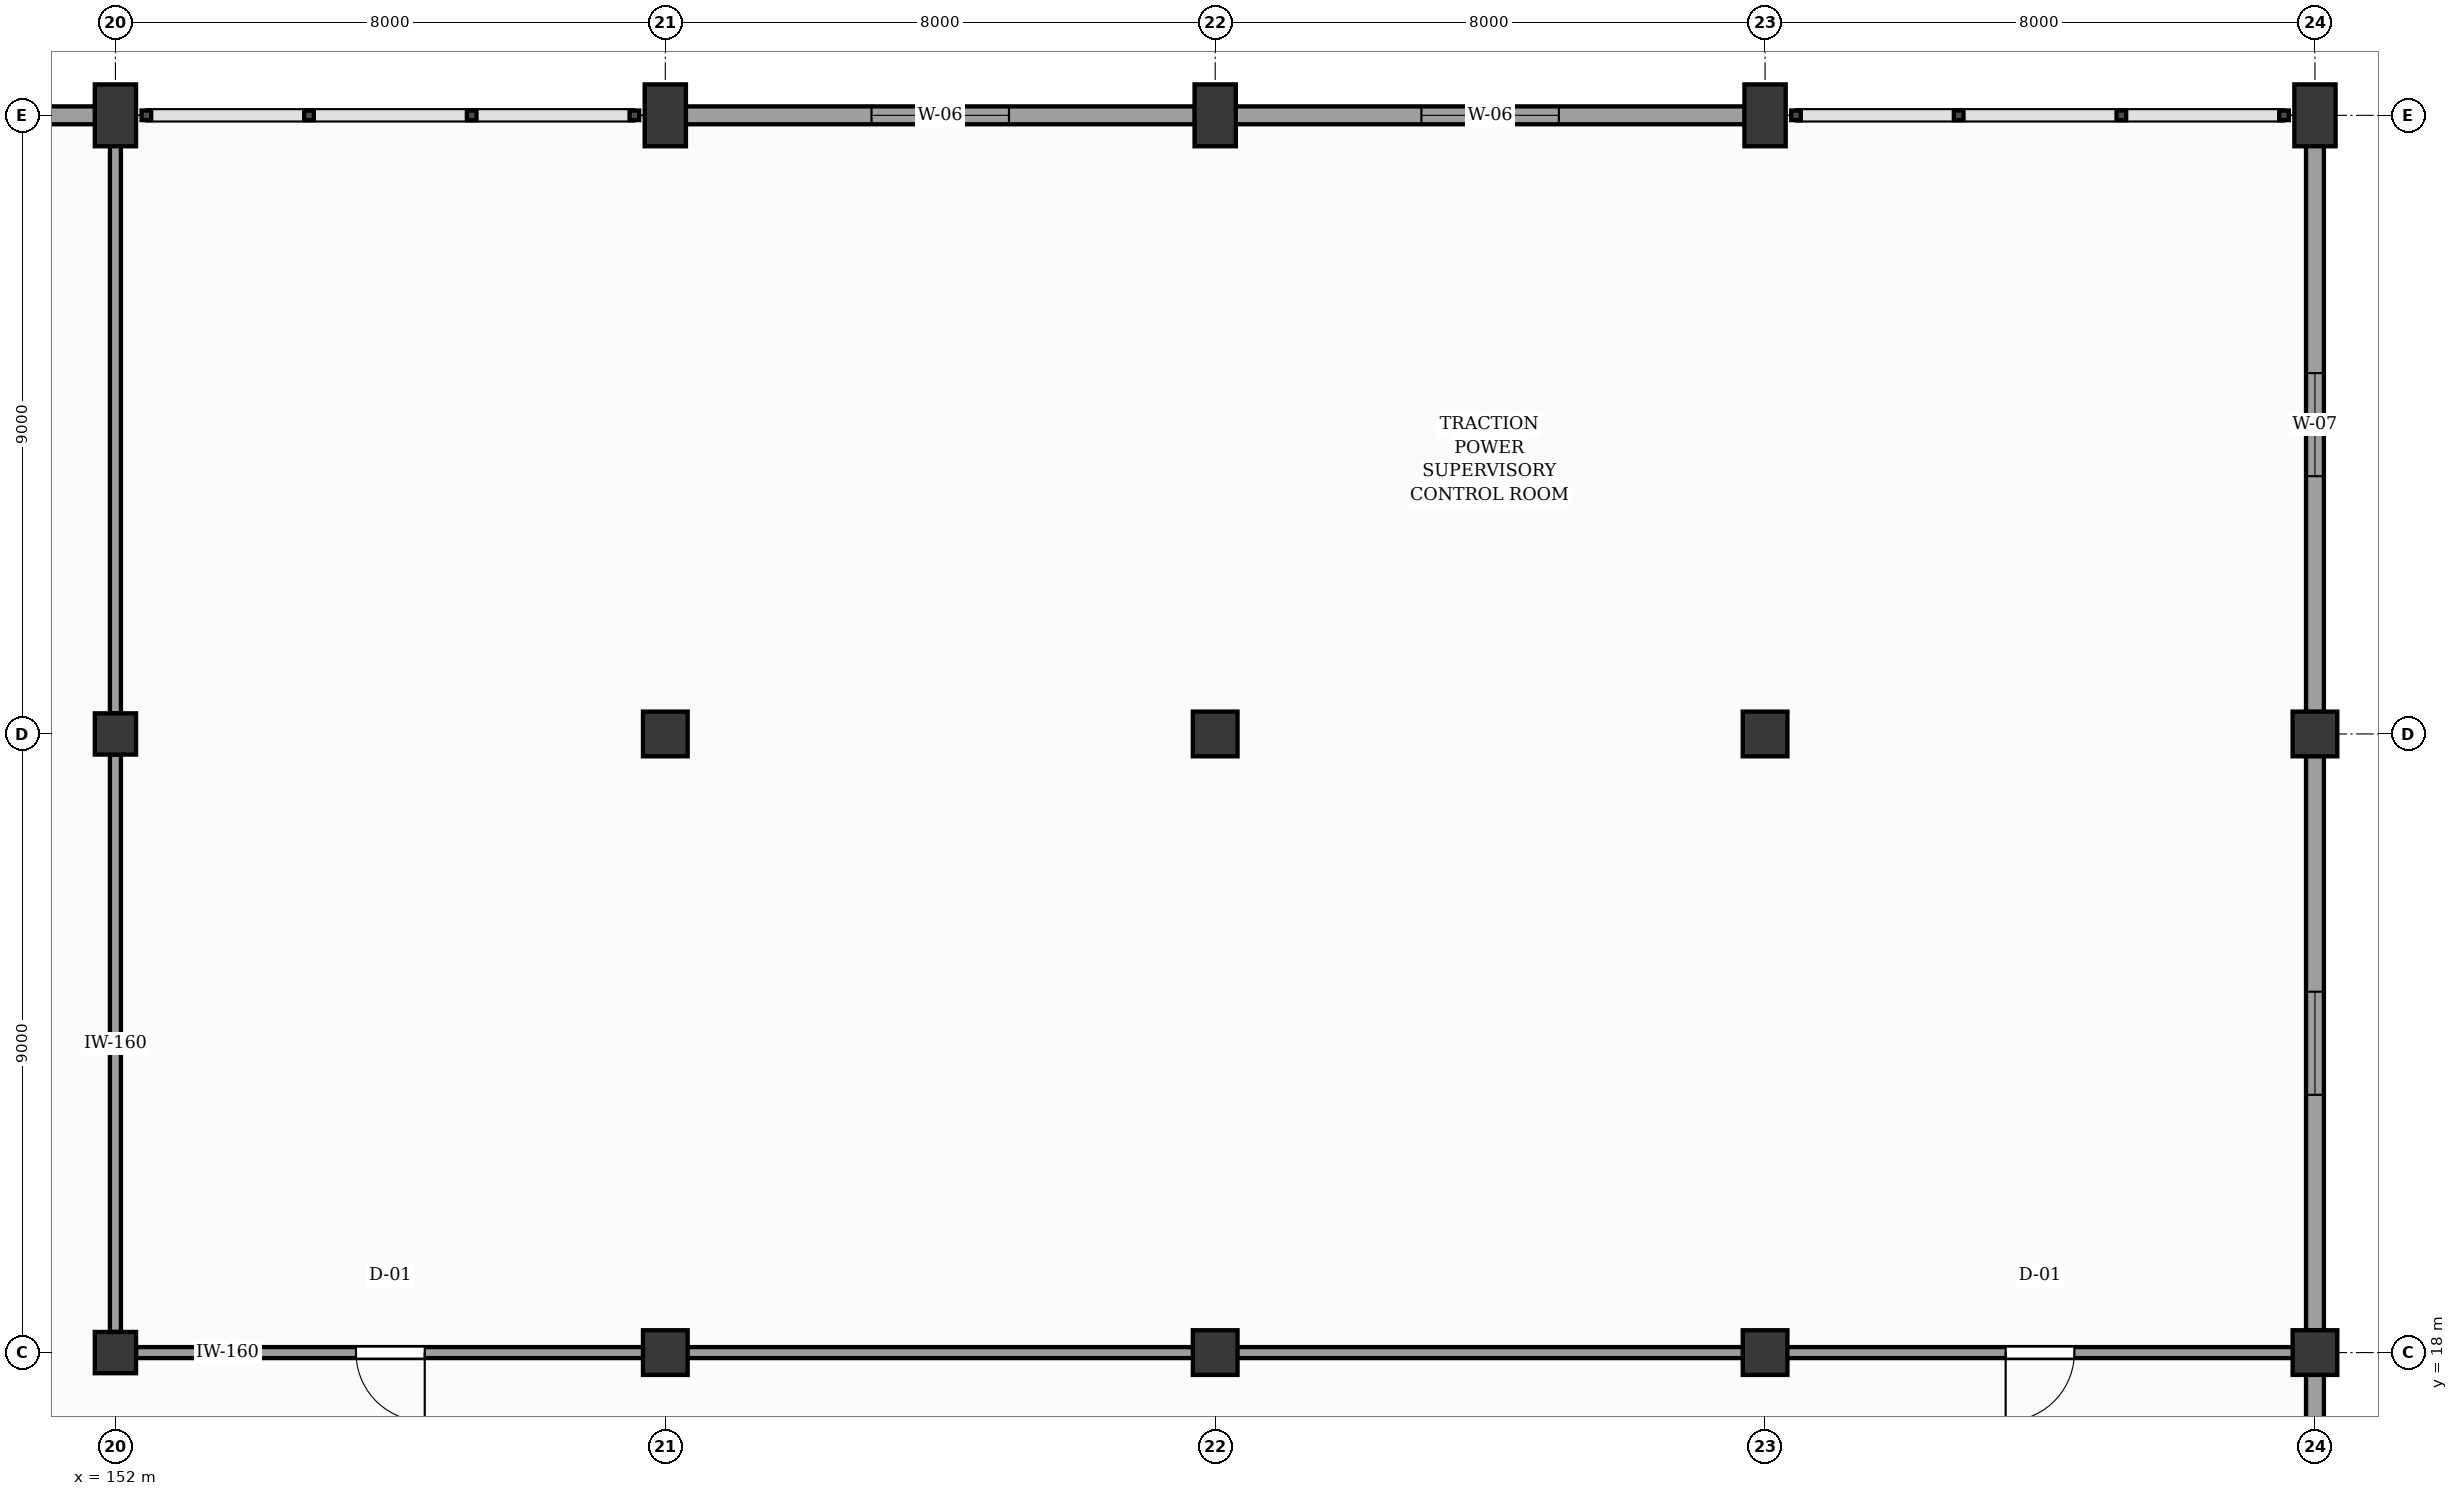
"""IFC4 building model, lengths in metres.
Left out: names, types, materials, properties, quantities, classifications, styles, units other than length and angle.
Written with IfcOpenShell. Run it as: python <this file> out.ifc"""

import sys

from ifc_helpers import new_model, si_unit, direction, frame, frame_2d, origin, origin_2d, place, context, subcontext, project, spatial, rectangle, extrude, element, fill, save


model = new_model("IFC4")
c1 = context("Model", 3, precision=1e-05, world=origin(), true_north=direction((0.0, 1.0)))
c2 = subcontext(c1, "Body", "Model", "MODEL_VIEW")
j1 = project(units=[si_unit("LENGTHUNIT", "METRE"), si_unit("PLANEANGLEUNIT", "RADIAN")], contexts=[c1])
p1 = place(None, origin())
s1 = spatial("IfcSite", under=j1, at=p1, CompositionType="ELEMENT")
p2 = place(p1, origin())
s2 = spatial("IfcBuilding", under=s1, at=p2, CompositionType="ELEMENT")
p3 = place(p2, frame((0.0, 0.0, 16.2)))
s3 = spatial("IfcBuildingStorey", under=s2, at=p3, CompositionType="ELEMENT", Elevation=16.2)
for number, where, z_axis, x_axis in (
    (1, (152.0, 18.0, 0.0), (0.0, 0.0, 1.0), (1.0, 0.0, 0.0)),
    (2, (152.0, 27.0, 0.0), (0.0, 0.0, 1.0), (1.0, 0.0, 0.0)),
):
    element("IfcColumn", number, at=place(p3, frame(where, z_axis=z_axis, x_axis=x_axis)), inside=s3, PredefinedType="COLUMN", context=c2, shape_type="SweptSolid", body=[
        extrude(rectangle(XDim=0.6, YDim=0.6, at=origin_2d()), origin(), (0.0, 0.0, 1.0), 4.2),
    ])
p4 = place(p3, frame((152.0, 36.0, 0.0), z_axis=(0.0, 0.0, 1.0), x_axis=(1.0, 0.0, 0.0)))
e3 = element("IfcColumn", 3, at=p4, inside=s3, PredefinedType="COLUMN", context=c2, shape_type="SweptSolid", body=[
    extrude(rectangle(XDim=0.6, YDim=0.9, at=origin_2d()), origin(), (0.0, 0.0, 1.0), 4.2),
])
for number, where, z_axis, x_axis in (
    (4, (160.0, 18.0, 0.0), (0.0, 0.0, 1.0), (1.0, 0.0, 0.0)),
    (5, (160.0, 27.0, 0.0), (0.0, 0.0, 1.0), (1.0, 0.0, 0.0)),
):
    element("IfcColumn", number, at=place(p3, frame(where, z_axis=z_axis, x_axis=x_axis)), inside=s3, PredefinedType="COLUMN", context=c2, shape_type="SweptSolid", body=[
        extrude(rectangle(XDim=0.65, YDim=0.65, at=origin_2d()), origin(), (0.0, 0.0, 1.0), 4.2),
    ])
p5 = place(p3, frame((160.0, 36.0, 0.0), z_axis=(0.0, 0.0, 1.0), x_axis=(1.0, 0.0, 0.0)))
e6 = element("IfcColumn", 6, at=p5, inside=s3, PredefinedType="COLUMN", context=c2, shape_type="SweptSolid", body=[
    extrude(rectangle(XDim=0.6, YDim=0.9, at=origin_2d()), origin(), (0.0, 0.0, 1.0), 4.2),
])
for number, where, z_axis, x_axis in (
    (7, (168.0, 18.0, 0.0), (0.0, 0.0, 1.0), (1.0, 0.0, 0.0)),
    (8, (168.0, 27.0, 0.0), (0.0, 0.0, 1.0), (1.0, 0.0, 0.0)),
):
    element("IfcColumn", number, at=place(p3, frame(where, z_axis=z_axis, x_axis=x_axis)), inside=s3, PredefinedType="COLUMN", context=c2, shape_type="SweptSolid", body=[
        extrude(rectangle(XDim=0.65, YDim=0.65, at=origin_2d()), origin(), (0.0, 0.0, 1.0), 4.2),
    ])
p6 = place(p3, frame((168.0, 36.0, 0.0), z_axis=(0.0, 0.0, 1.0), x_axis=(1.0, 0.0, 0.0)))
e9 = element("IfcColumn", 9, at=p6, inside=s3, PredefinedType="COLUMN", context=c2, shape_type="SweptSolid", body=[
    extrude(rectangle(XDim=0.6, YDim=0.9, at=origin_2d()), origin(), (0.0, 0.0, 1.0), 4.2),
])
for number, where, z_axis, x_axis in (
    (10, (176.0, 18.0, 0.0), (0.0, 0.0, 1.0), (1.0, 0.0, 0.0)),
    (11, (176.0, 27.0, 0.0), (0.0, 0.0, 1.0), (1.0, 0.0, 0.0)),
):
    element("IfcColumn", number, at=place(p3, frame(where, z_axis=z_axis, x_axis=x_axis)), inside=s3, PredefinedType="COLUMN", context=c2, shape_type="SweptSolid", body=[
        extrude(rectangle(XDim=0.65, YDim=0.65, at=origin_2d()), origin(), (0.0, 0.0, 1.0), 4.2),
    ])
p7 = place(p3, frame((176.0, 36.0, 0.0), z_axis=(0.0, 0.0, 1.0), x_axis=(1.0, 0.0, 0.0)))
e12 = element("IfcColumn", 12, at=p7, inside=s3, PredefinedType="COLUMN", context=c2, shape_type="SweptSolid", body=[
    extrude(rectangle(XDim=0.6, YDim=0.9, at=origin_2d()), origin(), (0.0, 0.0, 1.0), 4.2),
])
for number, where, z_axis, x_axis in (
    (13, (184.0, 18.0, 0.0), (0.0, 0.0, 1.0), (1.0, 0.0, 0.0)),
    (14, (184.0, 27.0, 0.0), (0.0, 0.0, 1.0), (1.0, 0.0, 0.0)),
):
    element("IfcColumn", number, at=place(p3, frame(where, z_axis=z_axis, x_axis=x_axis)), inside=s3, PredefinedType="COLUMN", context=c2, shape_type="SweptSolid", body=[
        extrude(rectangle(XDim=0.65, YDim=0.65, at=origin_2d()), origin(), (0.0, 0.0, 1.0), 4.2),
    ])
p8 = place(p3, frame((184.0, 36.0, 0.0), z_axis=(0.0, 0.0, 1.0), x_axis=(1.0, 0.0, 0.0)))
e15 = element("IfcColumn", 15, at=p8, inside=s3, PredefinedType="COLUMN", context=c2, shape_type="SweptSolid", body=[
    extrude(rectangle(XDim=0.6, YDim=0.9, at=origin_2d()), origin(), (0.0, 0.0, 1.0), 4.2),
])
p9 = place(p3, frame((144.295, 36.0, 0.0), z_axis=(0.0, 0.0, 1.0), x_axis=(1.0, 0.0, 0.0)))
e16 = element("IfcWall", 16, at=p9, inside=s3, PredefinedType="SOLIDWALL", context=c2, shape_type="SweptSolid", body=[
    extrude(rectangle(XDim=7.41, YDim=0.26, at=frame_2d((3.705, 0.0))), origin(), (0.0, 0.0, 1.0), 2.88),
])
p10 = place(p9, frame((2.705, 0.0, 1.45)))
e17 = element("IfcOpeningElement", 17, at=p10, cuts=e16, PredefinedType="OPENING", context=c2, shape_type="SweptSolid", body=[
    extrude(rectangle(XDim=2.0, YDim=1.29, at=frame_2d((1.0, 0.645))), frame((0.0, 0.14, 0.0), z_axis=(0.0, -1.0, 0.0), x_axis=(1.0, 0.0, 0.0)), (0.0, 0.0, 1.0), 0.28),
])
p11 = place(p3, frame((160.295, 36.0, 0.0), z_axis=(0.0, 0.0, 1.0), x_axis=(1.0, 0.0, 0.0)))
e18 = element("IfcWall", 18, at=p11, inside=s3, PredefinedType="SOLIDWALL", context=c2, shape_type="SweptSolid", body=[
    extrude(rectangle(XDim=7.41, YDim=0.26, at=frame_2d((3.705, 0.0))), origin(), (0.0, 0.0, 1.0), 2.88),
])
p12 = place(p11, frame((2.705, 0.0, 1.45)))
e19 = element("IfcOpeningElement", 19, at=p12, cuts=e18, PredefinedType="OPENING", context=c2, shape_type="SweptSolid", body=[
    extrude(rectangle(XDim=2.0, YDim=1.29, at=frame_2d((1.0, 0.645))), frame((0.0, 0.14, 0.0), z_axis=(0.0, -1.0, 0.0), x_axis=(1.0, 0.0, 0.0)), (0.0, 0.0, 1.0), 0.28),
])
p13 = place(p3, frame((168.295, 36.0, 0.0), z_axis=(0.0, 0.0, 1.0), x_axis=(1.0, 0.0, 0.0)))
e20 = element("IfcWall", 20, at=p13, inside=s3, PredefinedType="SOLIDWALL", context=c2, shape_type="SweptSolid", body=[
    extrude(rectangle(XDim=7.41, YDim=0.26, at=frame_2d((3.705, 0.0))), origin(), (0.0, 0.0, 1.0), 2.88),
])
p14 = place(p13, frame((2.705, 0.0, 1.45)))
e21 = element("IfcOpeningElement", 21, at=p14, cuts=e20, PredefinedType="OPENING", context=c2, shape_type="SweptSolid", body=[
    extrude(rectangle(XDim=2.0, YDim=1.29, at=frame_2d((1.0, 0.645))), frame((0.0, 0.14, 0.0), z_axis=(0.0, -1.0, 0.0), x_axis=(1.0, 0.0, 0.0)), (0.0, 0.0, 1.0), 0.28),
])
p15 = place(p3, frame((184.0, 9.32, 0.0), z_axis=(0.0, 0.0, 1.0), x_axis=(0.0, 1.0, 0.0)))
e22 = element("IfcWall", 22, at=p15, inside=s3, PredefinedType="SOLIDWALL", context=c2, shape_type="SweptSolid", body=[
    extrude(rectangle(XDim=8.36, YDim=0.26, at=frame_2d((4.18, 0.0))), origin(), (0.0, 0.0, 1.0), 3.13),
])
p16 = place(p15, frame((3.43, 0.0, 0.95)))
e23 = element("IfcOpeningElement", 23, at=p16, cuts=e22, PredefinedType="OPENING", context=c2, shape_type="SweptSolid", body=[
    extrude(rectangle(XDim=1.5, YDim=1.9, at=frame_2d((0.75, 0.95))), frame((0.0, 0.14, 0.0), z_axis=(0.0, -1.0, 0.0), x_axis=(1.0, 0.0, 0.0)), (0.0, 0.0, 1.0), 0.28),
])
p17 = place(p3, frame((184.0, 18.32, 0.0), z_axis=(0.0, 0.0, 1.0), x_axis=(0.0, 1.0, 0.0)))
e24 = element("IfcWall", 24, at=p17, inside=s3, PredefinedType="SOLIDWALL", context=c2, shape_type="SweptSolid", body=[
    extrude(rectangle(XDim=8.36, YDim=0.26, at=frame_2d((4.18, 0.0))), origin(), (0.0, 0.0, 1.0), 3.13),
])
p18 = place(p17, frame((3.43, 0.0, 0.95)))
e25 = element("IfcOpeningElement", 25, at=p18, cuts=e24, PredefinedType="OPENING", context=c2, shape_type="SweptSolid", body=[
    extrude(rectangle(XDim=1.5, YDim=1.9, at=frame_2d((0.75, 0.95))), frame((0.0, 0.14, 0.0), z_axis=(0.0, -1.0, 0.0), x_axis=(1.0, 0.0, 0.0)), (0.0, 0.0, 1.0), 0.28),
])
p19 = place(p3, frame((184.0, 27.32, 0.0), z_axis=(0.0, 0.0, 1.0), x_axis=(0.0, 1.0, 0.0)))
e26 = element("IfcWall", 26, at=p19, inside=s3, PredefinedType="SOLIDWALL", context=c2, shape_type="SweptSolid", body=[
    extrude(rectangle(XDim=8.28, YDim=0.26, at=frame_2d((4.14, 0.0))), origin(), (0.0, 0.0, 1.0), 2.88),
])
p20 = place(p19, frame((3.43, 0.0, 0.95)))
e27 = element("IfcOpeningElement", 27, at=p20, cuts=e26, PredefinedType="OPENING", context=c2, shape_type="SweptSolid", body=[
    extrude(rectangle(XDim=1.5, YDim=1.79, at=frame_2d((0.75, 0.895))), frame((0.0, 0.14, 0.0), z_axis=(0.0, -1.0, 0.0), x_axis=(1.0, 0.0, 0.0)), (0.0, 0.0, 1.0), 0.28),
])
p21 = place(p3, frame((152.3, 18.0, 0.0), z_axis=(0.0, 0.0, 1.0), x_axis=(1.0, 0.0, 0.0)))
e28 = element("IfcWall", 28, at=p21, inside=s3, PredefinedType="PARTITIONING", context=c2, shape_type="SweptSolid", body=[
    extrude(rectangle(XDim=7.4, YDim=0.16, at=frame_2d((3.7, 0.0))), origin(), (0.0, 0.0, 1.0), 3.1),
])
p22 = place(p21, frame((3.2, 0.0, 0.0)))
e29 = element("IfcOpeningElement", 29, at=p22, cuts=e28, PredefinedType="OPENING", context=c2, shape_type="SweptSolid", body=[
    extrude(rectangle(XDim=1.0, YDim=2.1, at=frame_2d((0.5, 1.05))), frame((0.0, 0.09, 0.0), z_axis=(0.0, -1.0, 0.0), x_axis=(1.0, 0.0, 0.0)), (0.0, 0.0, 1.0), 0.18),
])
for number, where, z_axis, x_axis in (
    (30, (160.3, 18.0, 0.0), (0.0, 0.0, 1.0), (1.0, 0.0, 0.0)),
    (31, (168.3, 18.0, 0.0), (0.0, 0.0, 1.0), (1.0, 0.0, 0.0)),
):
    element("IfcWall", number, at=place(p3, frame(where, z_axis=z_axis, x_axis=x_axis)), inside=s3, PredefinedType="PARTITIONING", context=c2, shape_type="SweptSolid", body=[
        extrude(rectangle(XDim=7.4, YDim=0.16, at=frame_2d((3.7, 0.0))), origin(), (0.0, 0.0, 1.0), 3.1),
    ])
p23 = place(p3, frame((176.3, 18.0, 0.0), z_axis=(0.0, 0.0, 1.0), x_axis=(1.0, 0.0, 0.0)))
e32 = element("IfcWall", 32, at=p23, inside=s3, PredefinedType="PARTITIONING", context=c2, shape_type="SweptSolid", body=[
    extrude(rectangle(XDim=7.4, YDim=0.16, at=frame_2d((3.7, 0.0))), origin(), (0.0, 0.0, 1.0), 3.1),
])
p24 = place(p23, frame((3.2, 0.0, 0.0)))
e33 = element("IfcOpeningElement", 33, at=p24, cuts=e32, PredefinedType="OPENING", context=c2, shape_type="SweptSolid", body=[
    extrude(rectangle(XDim=1.0, YDim=2.1, at=frame_2d((0.5, 1.05))), frame((0.0, 0.09, 0.0), z_axis=(0.0, -1.0, 0.0), x_axis=(1.0, 0.0, 0.0)), (0.0, 0.0, 1.0), 0.18),
])
p25 = place(p3, frame((152.0, 18.3, 0.0), z_axis=(0.0, 0.0, 1.0), x_axis=(0.0, 1.0, 0.0)))
e34 = element("IfcWall", 34, at=p25, inside=s3, PredefinedType="PARTITIONING", context=c2, shape_type="SweptSolid", body=[
    extrude(rectangle(XDim=8.4, YDim=0.16, at=frame_2d((4.2, 0.0))), origin(), (0.0, 0.0, 1.0), 3.1),
])
p26 = place(p3, frame((152.0, 27.3, 0.0), z_axis=(0.0, 0.0, 1.0), x_axis=(0.0, 1.0, 0.0)))
e35 = element("IfcWall", 35, at=p26, inside=s3, PredefinedType="PARTITIONING", context=c2, shape_type="SweptSolid", body=[
    extrude(rectangle(XDim=8.4, YDim=0.16, at=frame_2d((4.2, 0.0))), origin(), (0.0, 0.0, 1.0), 2.88),
])
p27 = place(p12, origin())
e36 = element("IfcWindow", 36, at=p27, inside=s3, PartitioningType="SINGLE_PANEL", PredefinedType="WINDOW", context=c2, shape_type="SweptSolid", body=[
    extrude(rectangle(XDim=2.0, YDim=1.29, at=frame_2d((1.0, 0.645))), frame((0.0, 0.03, 0.0), z_axis=(0.0, -1.0, 0.0), x_axis=(1.0, 0.0, 0.0)), (0.0, 0.0, 1.0), 0.06),
])
fill(e19, e36)
p28 = place(p14, origin())
e37 = element("IfcWindow", 37, at=p28, inside=s3, PartitioningType="SINGLE_PANEL", PredefinedType="WINDOW", context=c2, shape_type="SweptSolid", body=[
    extrude(rectangle(XDim=2.0, YDim=1.29, at=frame_2d((1.0, 0.645))), frame((0.0, 0.03, 0.0), z_axis=(0.0, -1.0, 0.0), x_axis=(1.0, 0.0, 0.0)), (0.0, 0.0, 1.0), 0.06),
])
fill(e21, e37)
p29 = place(p18, origin())
e38 = element("IfcWindow", 38, at=p29, inside=s3, PartitioningType="SINGLE_PANEL", PredefinedType="WINDOW", context=c2, shape_type="SweptSolid", body=[
    extrude(rectangle(XDim=1.5, YDim=1.9, at=frame_2d((0.75, 0.95))), frame((0.0, 0.03, 0.0), z_axis=(0.0, -1.0, 0.0), x_axis=(1.0, 0.0, 0.0)), (0.0, 0.0, 1.0), 0.06),
])
fill(e25, e38)
p30 = place(p20, origin())
e39 = element("IfcWindow", 39, at=p30, inside=s3, PartitioningType="SINGLE_PANEL", PredefinedType="WINDOW", context=c2, shape_type="SweptSolid", body=[
    extrude(rectangle(XDim=1.5, YDim=1.79, at=frame_2d((0.75, 0.895))), frame((0.0, 0.03, 0.0), z_axis=(0.0, -1.0, 0.0), x_axis=(1.0, 0.0, 0.0)), (0.0, 0.0, 1.0), 0.06),
])
fill(e27, e39)
p31 = place(p22, frame((1.0, 0.0, 0.0), z_axis=(0.0, 0.0, 1.0), x_axis=(-1.0, 0.0, 0.0)))
e40 = element("IfcDoor", 40, at=p31, inside=s3, OperationType="SINGLE_SWING_RIGHT", PredefinedType="DOOR", context=c2, shape_type="SweptSolid", body=[
    extrude(rectangle(XDim=1.0, YDim=2.1, at=frame_2d((0.5, 1.05))), frame((0.0, 0.025, 0.0), z_axis=(0.0, -1.0, 0.0), x_axis=(1.0, 0.0, 0.0)), (0.0, 0.0, 1.0), 0.05),
])
fill(e29, e40)
p32 = place(p24, frame((1.0, 0.0, 0.0), z_axis=(0.0, 0.0, 1.0), x_axis=(-1.0, 0.0, 0.0)))
e41 = element("IfcDoor", 41, at=p32, inside=s3, OperationType="SINGLE_SWING_LEFT", PredefinedType="DOOR", context=c2, shape_type="SweptSolid", body=[
    extrude(rectangle(XDim=1.0, YDim=2.1, at=frame_2d((0.5, 1.05))), frame((0.0, 0.025, 0.0), z_axis=(0.0, -1.0, 0.0), x_axis=(1.0, 0.0, 0.0)), (0.0, 0.0, 1.0), 0.05),
])
fill(e33, e41)
save(model, sys.argv[1])
